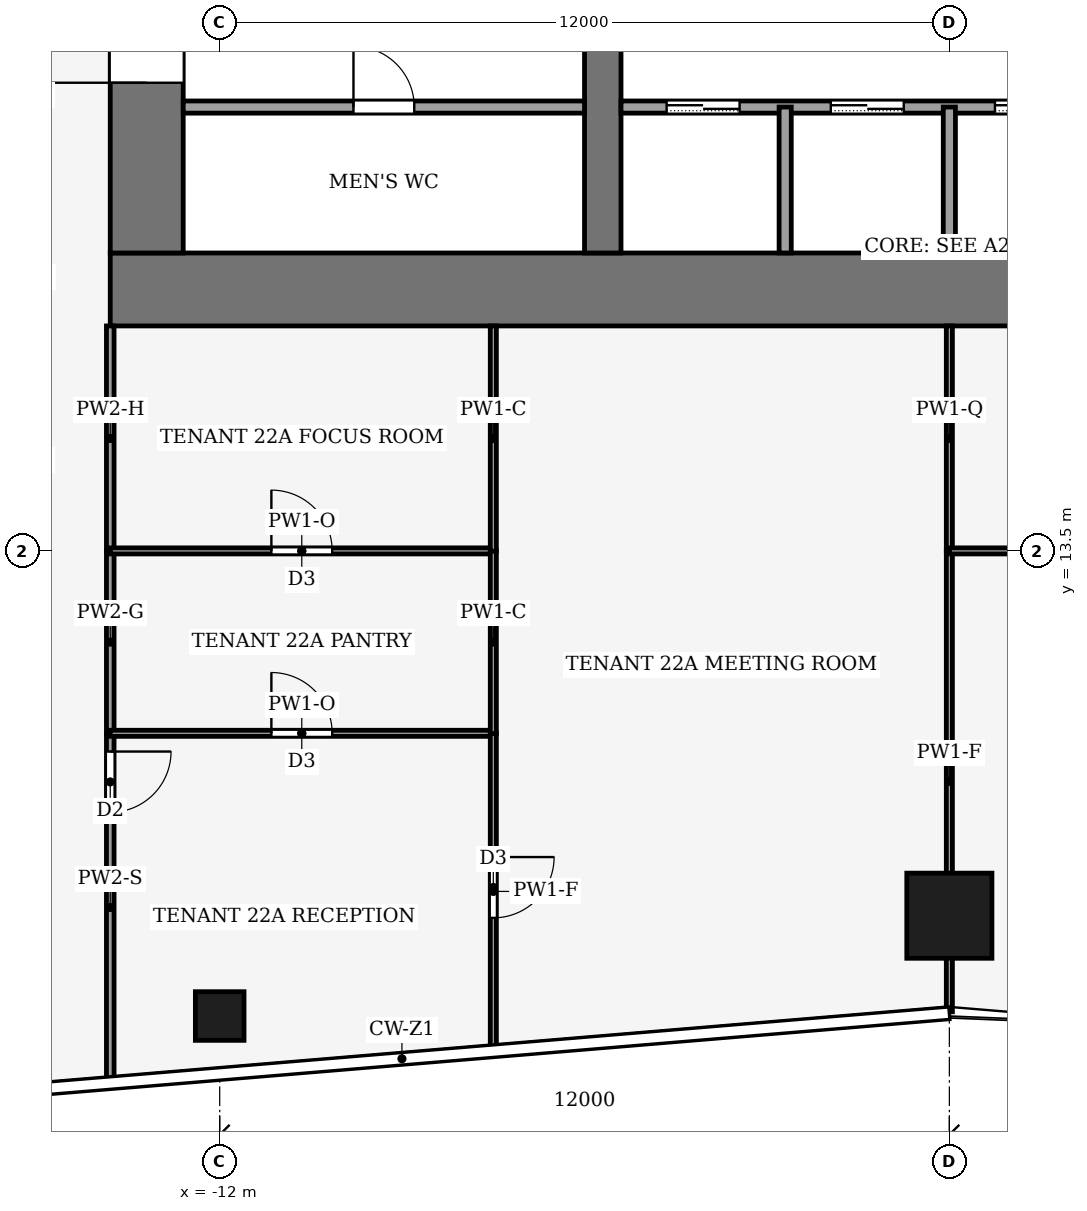
"""IFC4 building model, lengths in metres.
Left out: names, types, materials, properties, quantities, classifications, styles, units other than length and angle.
Written with IfcOpenShell. Run it as: python <this file> out.ifc"""

import sys

from ifc_helpers import new_model, si_unit, direction, frame, frame_2d, origin, origin_2d, place, context, subcontext, project, spatial, rectangle, hollow_rectangle, extrude, element, fill, save


model = new_model("IFC4")
c1 = context("Model", 3, precision=1e-05, world=origin(), true_north=direction((0.0, 1.0)))
c2 = subcontext(c1, "Body", "Model", "MODEL_VIEW")
j1 = project(units=[si_unit("LENGTHUNIT", "METRE"), si_unit("PLANEANGLEUNIT", "RADIAN")], contexts=[c1])
p1 = place(None, origin())
s1 = spatial("IfcSite", under=j1, at=p1, CompositionType="ELEMENT")
p2 = place(p1, origin())
s2 = spatial("IfcBuilding", under=s1, at=p2, CompositionType="ELEMENT")
p3 = place(p2, frame((0.0, 0.0, 98.0)))
s3 = spatial("IfcBuildingStorey", under=s2, at=p3, CompositionType="ELEMENT", Elevation=98.0)
p4 = place(p3, frame((-13.8, 17.8, -0.13), z_axis=(0.0, 0.0, 1.0), x_axis=(1.0, 0.0, 0.0)))
e1 = element("IfcWall", 1, at=p4, inside=s3, PredefinedType="SHEAR", context=c2, shape_type="SweptSolid", body=[
    extrude(rectangle(XDim=27.6, YDim=1.2, at=frame_2d((13.8, 0.0))), origin(), (0.0, 0.0, 1.0), 4.0),
])
p5 = place(p3, frame((-13.2, 18.4, -0.13), z_axis=(0.0, 0.0, 1.0), x_axis=(0.0, 1.0, 0.0)))
e2 = element("IfcWall", 2, at=p5, inside=s3, PredefinedType="SHEAR", context=c2, shape_type="SweptSolid", body=[
    extrude(rectangle(XDim=19.2, YDim=1.2, at=frame_2d((9.6, 0.0))), origin(), (0.0, 0.0, 1.0), 4.0),
])
p6 = place(p5, frame((2.8, 0.0, 0.13)))
e3 = element("IfcOpeningElement", 3, at=p6, cuts=e2, PredefinedType="OPENING", context=c2, shape_type="SweptSolid", body=[
    extrude(rectangle(XDim=2.4, YDim=2.4, at=frame_2d((1.2, 1.2))), frame((0.0, 0.61, 0.0), z_axis=(0.0, -1.0, 0.0), x_axis=(1.0, 0.0, 0.0)), (0.0, 0.0, 1.0), 1.22),
])
p7 = place(p5, frame((13.4, 0.0, 0.13)))
e4 = element("IfcOpeningElement", 4, at=p7, cuts=e2, PredefinedType="OPENING", context=c2, shape_type="SweptSolid", body=[
    extrude(rectangle(XDim=1.4, YDim=2.2, at=frame_2d((0.7, 1.1))), frame((0.0, 0.61, 0.0), z_axis=(0.0, -1.0, 0.0), x_axis=(1.0, 0.0, 0.0)), (0.0, 0.0, 1.0), 1.22),
])
p8 = place(p3, frame((-5.7, 18.4, -0.13), z_axis=(0.0, 0.0, 1.0), x_axis=(0.0, 1.0, 0.0)))
e5 = element("IfcWall", 5, at=p8, inside=s3, PredefinedType="SHEAR", context=c2, shape_type="SweptSolid", body=[
    extrude(rectangle(XDim=19.2, YDim=0.6, at=frame_2d((9.6, 0.0))), origin(), (0.0, 0.0, 1.0), 4.0),
])
p9 = place(p8, frame((8.35, 0.0, 0.13)))
e6 = element("IfcOpeningElement", 6, at=p9, cuts=e5, PredefinedType="OPENING", context=c2, shape_type="SweptSolid", body=[
    extrude(rectangle(XDim=0.9, YDim=2.1, at=frame_2d((0.45, 1.05))), frame((0.0, 0.31, 0.0), z_axis=(0.0, -1.0, 0.0), x_axis=(1.0, 0.0, 0.0)), (0.0, 0.0, 1.0), 0.62),
])
p10 = place(p3, frame((0.0, 7.5, 0.0), z_axis=(0.0, 0.0, 1.0), x_axis=(1.0, 0.0, 0.0)))
e7 = element("IfcColumn", 7, at=p10, inside=s3, PredefinedType="COLUMN", context=c2, shape_type="SweptSolid", body=[
    extrude(hollow_rectangle(XDim=1.4, YDim=1.4, WallThickness=0.08, at=origin_2d()), origin(), (0.0, 0.0, 1.0), 4.0),
])
p11 = place(p3, frame((-12.0, 5.85, 0.0), z_axis=(0.0, 0.0, 1.0), x_axis=(1.0, 0.0, 0.0)))
e8 = element("IfcColumn", 8, at=p11, inside=s3, PredefinedType="COLUMN", context=c2, shape_type="SweptSolid", body=[
    extrude(hollow_rectangle(XDim=0.8, YDim=0.8, WallThickness=0.04, at=origin_2d()), origin(), (0.0, 0.0, 1.0), 4.0),
])
p12 = place(p3, frame((-12.6, 20.8, 0.0), z_axis=(0.0, 0.0, 1.0), x_axis=(1.0, 0.0, 0.0)))
e9 = element("IfcWall", 9, at=p12, inside=s3, PredefinedType="PARTITIONING", context=c2, shape_type="SweptSolid", body=[
    extrude(rectangle(XDim=6.6, YDim=0.2, at=frame_2d((3.3, 0.0))), origin(), (0.0, 0.0, 1.0), 3.87),
])
p13 = place(p12, frame((2.8, 0.0, 0.0)))
e10 = element("IfcOpeningElement", 10, at=p13, cuts=e9, PredefinedType="OPENING", context=c2, shape_type="SweptSolid", body=[
    extrude(rectangle(XDim=1.0, YDim=2.1, at=frame_2d((0.5, 1.05))), frame((0.0, 0.11, 0.0), z_axis=(0.0, -1.0, 0.0), x_axis=(1.0, 0.0, 0.0)), (0.0, 0.0, 1.0), 0.22),
])
p14 = place(p3, frame((-5.4, 20.8, 0.0), z_axis=(0.0, 0.0, 1.0), x_axis=(1.0, 0.0, 0.0)))
e11 = element("IfcWall", 11, at=p14, inside=s3, PredefinedType="PARTITIONING", context=c2, shape_type="SweptSolid", body=[
    extrude(rectangle(XDim=10.8, YDim=0.2, at=frame_2d((5.4, 0.0))), origin(), (0.0, 0.0, 1.0), 3.87),
])
p15 = place(p14, frame((0.75, 0.0, 0.0)))
e12 = element("IfcOpeningElement", 12, at=p15, cuts=e11, PredefinedType="OPENING", context=c2, shape_type="SweptSolid", body=[
    extrude(rectangle(XDim=1.2, YDim=2.2, at=frame_2d((0.6, 1.1))), frame((0.0, 0.11, 0.0), z_axis=(0.0, -1.0, 0.0), x_axis=(1.0, 0.0, 0.0)), (0.0, 0.0, 1.0), 0.22),
])
p16 = place(p14, frame((3.45, 0.0, 0.0)))
e13 = element("IfcOpeningElement", 13, at=p16, cuts=e11, PredefinedType="OPENING", context=c2, shape_type="SweptSolid", body=[
    extrude(rectangle(XDim=1.2, YDim=2.2, at=frame_2d((0.6, 1.1))), frame((0.0, 0.11, 0.0), z_axis=(0.0, -1.0, 0.0), x_axis=(1.0, 0.0, 0.0)), (0.0, 0.0, 1.0), 0.22),
])
p17 = place(p14, frame((6.15, 0.0, 0.0)))
e14 = element("IfcOpeningElement", 14, at=p17, cuts=e11, PredefinedType="OPENING", context=c2, shape_type="SweptSolid", body=[
    extrude(rectangle(XDim=1.2, YDim=2.2, at=frame_2d((0.6, 1.1))), frame((0.0, 0.11, 0.0), z_axis=(0.0, -1.0, 0.0), x_axis=(1.0, 0.0, 0.0)), (0.0, 0.0, 1.0), 0.22),
])
p18 = place(p14, frame((8.85, 0.0, 0.0)))
e15 = element("IfcOpeningElement", 15, at=p18, cuts=e11, PredefinedType="OPENING", context=c2, shape_type="SweptSolid", body=[
    extrude(rectangle(XDim=1.2, YDim=2.2, at=frame_2d((0.6, 1.1))), frame((0.0, 0.11, 0.0), z_axis=(0.0, -1.0, 0.0), x_axis=(1.0, 0.0, 0.0)), (0.0, 0.0, 1.0), 0.22),
])
for number, where, z_axis, x_axis in (
    (16, (-2.7, 18.4, 0.0), (0.0, 0.0, 1.0), (0.0, 1.0, 0.0)),
    (17, (0.0, 18.4, 0.0), (0.0, 0.0, 1.0), (0.0, 1.0, 0.0)),
):
    element("IfcWall", number, at=place(p3, frame(where, z_axis=z_axis, x_axis=x_axis)), inside=s3, PredefinedType="PARTITIONING", context=c2, shape_type="SweptSolid", body=[
        extrude(rectangle(XDim=2.4, YDim=0.2, at=frame_2d((1.2, 0.0))), origin(), (0.0, 0.0, 1.0), 3.87),
    ])
p19 = place(p3, frame((-13.8, 10.5, 0.0), z_axis=(0.0, 0.0, 1.0), x_axis=(0.0, -1.0, 0.0)))
e18 = element("IfcWall", 18, at=p19, inside=s3, PredefinedType="PARTITIONING", context=c2, shape_type="SweptSolid", body=[
    extrude(rectangle(XDim=5.73, YDim=0.125, at=frame_2d((2.865, 0.0))), origin(), (0.0, 0.0, 1.0), 3.04),
])
p20 = place(p19, frame((0.3, 0.0, 0.0)))
e19 = element("IfcOpeningElement", 19, at=p20, cuts=e18, PredefinedType="OPENING", context=c2, shape_type="SweptSolid", body=[
    extrude(rectangle(XDim=1.0, YDim=2.1, at=frame_2d((0.5, 1.05))), frame((0.0, 0.073, 0.0), z_axis=(0.0, -1.0, 0.0), x_axis=(1.0, 0.0, 0.0)), (0.0, 0.0, 1.0), 0.145),
])
p21 = place(p3, frame((-13.8, 10.5, 0.0), z_axis=(0.0, 0.0, 1.0), x_axis=(0.0, 1.0, 0.0)))
e20 = element("IfcWall", 20, at=p21, inside=s3, PredefinedType="PARTITIONING", context=c2, shape_type="SweptSolid", body=[
    extrude(rectangle(XDim=3.0, YDim=0.125, at=frame_2d((1.5, 0.0))), origin(), (0.0, 0.0, 1.0), 3.87),
])
p22 = place(p3, frame((-13.8, 13.5, 0.0), z_axis=(0.0, 0.0, 1.0), x_axis=(0.0, 1.0, 0.0)))
e21 = element("IfcWall", 21, at=p22, inside=s3, PredefinedType="PARTITIONING", context=c2, shape_type="SweptSolid", body=[
    extrude(rectangle(XDim=3.7, YDim=0.125, at=frame_2d((1.85, 0.0))), origin(), (0.0, 0.0, 1.0), 3.14),
])
p23 = place(p3, frame((-13.8, 10.5, 0.0), z_axis=(0.0, 0.0, 1.0), x_axis=(1.0, 0.0, 0.0)))
e22 = element("IfcWall", 22, at=p23, inside=s3, PredefinedType="PARTITIONING", context=c2, shape_type="SweptSolid", body=[
    extrude(rectangle(XDim=6.3, YDim=0.1, at=frame_2d((3.15, 0.0))), origin(), (0.0, 0.0, 1.0), 3.39),
])
p24 = place(p23, frame((2.65, 0.0, 0.0)))
e23 = element("IfcOpeningElement", 23, at=p24, cuts=e22, PredefinedType="OPENING", context=c2, shape_type="SweptSolid", body=[
    extrude(rectangle(XDim=1.0, YDim=2.1, at=frame_2d((0.5, 1.05))), frame((0.0, 0.06, 0.0), z_axis=(0.0, -1.0, 0.0), x_axis=(1.0, 0.0, 0.0)), (0.0, 0.0, 1.0), 0.12),
])
p25 = place(p3, frame((-7.5, 10.504, 0.0), z_axis=(0.0, 0.0, 1.0), x_axis=(0.0, -1.0, 0.0)))
e24 = element("IfcWall", 24, at=p25, inside=s3, PredefinedType="PARTITIONING", context=c2, shape_type="SweptSolid", body=[
    extrude(rectangle(XDim=5.209, YDim=0.1, at=frame_2d((2.604, 0.0))), origin(), (0.0, 0.0, 1.0), 3.04),
])
p26 = place(p25, frame((2.039, 0.0, 0.0)))
e25 = element("IfcOpeningElement", 25, at=p26, cuts=e24, PredefinedType="OPENING", context=c2, shape_type="SweptSolid", body=[
    extrude(rectangle(XDim=1.0, YDim=2.1, at=frame_2d((0.5, 1.05))), frame((0.0, 0.06, 0.0), z_axis=(0.0, -1.0, 0.0), x_axis=(1.0, 0.0, 0.0)), (0.0, 0.0, 1.0), 0.12),
])
p27 = place(p3, frame((-13.8, 13.5, 0.0), z_axis=(0.0, 0.0, 1.0), x_axis=(1.0, 0.0, 0.0)))
e26 = element("IfcWall", 26, at=p27, inside=s3, PredefinedType="PARTITIONING", context=c2, shape_type="SweptSolid", body=[
    extrude(rectangle(XDim=6.3, YDim=0.1, at=frame_2d((3.15, 0.0))), origin(), (0.0, 0.0, 1.0), 3.39),
])
p28 = place(p27, frame((2.65, 0.0, 0.0)))
e27 = element("IfcOpeningElement", 27, at=p28, cuts=e26, PredefinedType="OPENING", context=c2, shape_type="SweptSolid", body=[
    extrude(rectangle(XDim=1.0, YDim=2.1, at=frame_2d((0.5, 1.05))), frame((0.0, 0.06, 0.0), z_axis=(0.0, -1.0, 0.0), x_axis=(1.0, 0.0, 0.0)), (0.0, 0.0, 1.0), 0.12),
])
p29 = place(p3, frame((-7.5, 10.496, 0.0), z_axis=(0.0, 0.0, 1.0), x_axis=(0.0, 1.0, 0.0)))
e28 = element("IfcWall", 28, at=p29, inside=s3, PredefinedType="PARTITIONING", context=c2, shape_type="SweptSolid", body=[
    extrude(rectangle(XDim=3.008, YDim=0.1, at=frame_2d((1.504, 0.0))), origin(), (0.0, 0.0, 1.0), 3.87),
])
p30 = place(p3, frame((-7.5, 13.496, 0.0), z_axis=(0.0, 0.0, 1.0), x_axis=(0.0, 1.0, 0.0)))
e29 = element("IfcWall", 29, at=p30, inside=s3, PredefinedType="PARTITIONING", context=c2, shape_type="SweptSolid", body=[
    extrude(rectangle(XDim=3.704, YDim=0.1, at=frame_2d((1.852, 0.0))), origin(), (0.0, 0.0, 1.0), 3.87),
])
p31 = place(p3, frame((0.0, 5.92, 0.0), z_axis=(0.0, 0.0, 1.0), x_axis=(0.0, 1.0, 0.0)))
e30 = element("IfcWall", 30, at=p31, inside=s3, PredefinedType="PARTITIONING", context=c2, shape_type="SweptSolid", body=[
    extrude(rectangle(XDim=7.58, YDim=0.1, at=frame_2d((3.79, 0.0))), origin(), (0.0, 0.0, 1.0), 3.04),
])
p32 = place(p3, frame((0.0, 13.5, 0.0), z_axis=(0.0, 0.0, 1.0), x_axis=(0.0, 1.0, 0.0)))
e31 = element("IfcWall", 31, at=p32, inside=s3, PredefinedType="PARTITIONING", context=c2, shape_type="SweptSolid", body=[
    extrude(rectangle(XDim=3.7, YDim=0.1, at=frame_2d((1.85, 0.0))), origin(), (0.0, 0.0, 1.0), 3.48),
])
p33 = place(p3, frame((0.0, 13.5, 0.0), z_axis=(0.0, 0.0, 1.0), x_axis=(1.0, 0.0, 0.0)))
e32 = element("IfcWall", 32, at=p33, inside=s3, PredefinedType="PARTITIONING", context=c2, shape_type="SweptSolid", body=[
    extrude(rectangle(XDim=7.5, YDim=0.1, at=frame_2d((3.75, 0.0))), origin(), (0.0, 0.0, 1.0), 3.44),
])
p34 = place(p33, frame((3.25, 0.0, 0.0)))
e33 = element("IfcOpeningElement", 33, at=p34, cuts=e32, PredefinedType="OPENING", context=c2, shape_type="SweptSolid", body=[
    extrude(rectangle(XDim=1.0, YDim=2.1, at=frame_2d((0.5, 1.05))), frame((0.0, 0.06, 0.0), z_axis=(0.0, -1.0, 0.0), x_axis=(1.0, 0.0, 0.0)), (0.0, 0.0, 1.0), 0.12),
])
p35 = place(p15, origin())
e34 = element("IfcDoor", 34, at=p35, inside=s3, OperationType="SLIDING_TO_LEFT", PredefinedType="DOOR", context=c2, shape_type="SweptSolid", body=[
    extrude(rectangle(XDim=1.2, YDim=2.2, at=frame_2d((0.6, 1.1))), frame((0.0, 0.025, 0.0), z_axis=(0.0, -1.0, 0.0), x_axis=(1.0, 0.0, 0.0)), (0.0, 0.0, 1.0), 0.05),
])
fill(e12, e34)
p36 = place(p16, origin())
e35 = element("IfcDoor", 35, at=p36, inside=s3, OperationType="SLIDING_TO_LEFT", PredefinedType="DOOR", context=c2, shape_type="SweptSolid", body=[
    extrude(rectangle(XDim=1.2, YDim=2.2, at=frame_2d((0.6, 1.1))), frame((0.0, 0.025, 0.0), z_axis=(0.0, -1.0, 0.0), x_axis=(1.0, 0.0, 0.0)), (0.0, 0.0, 1.0), 0.05),
])
fill(e13, e35)
p37 = place(p17, origin())
e36 = element("IfcDoor", 36, at=p37, inside=s3, OperationType="SLIDING_TO_LEFT", PredefinedType="DOOR", context=c2, shape_type="SweptSolid", body=[
    extrude(rectangle(XDim=1.2, YDim=2.2, at=frame_2d((0.6, 1.1))), frame((0.0, 0.025, 0.0), z_axis=(0.0, -1.0, 0.0), x_axis=(1.0, 0.0, 0.0)), (0.0, 0.0, 1.0), 0.05),
])
fill(e14, e36)
p38 = place(p13, origin())
e37 = element("IfcDoor", 37, at=p38, inside=s3, OperationType="SINGLE_SWING_LEFT", PredefinedType="DOOR", context=c2, shape_type="SweptSolid", body=[
    extrude(rectangle(XDim=1.0, YDim=2.1, at=frame_2d((0.5, 1.05))), frame((0.0, 0.025, 0.0), z_axis=(0.0, -1.0, 0.0), x_axis=(1.0, 0.0, 0.0)), (0.0, 0.0, 1.0), 0.05),
])
fill(e10, e37)
p39 = place(p6, origin())
e38 = element("IfcDoor", 38, at=p39, inside=s3, OperationType="DOUBLE_DOOR_SINGLE_SWING", PredefinedType="DOOR", context=c2, shape_type="SweptSolid", body=[
    extrude(rectangle(XDim=2.4, YDim=2.4, at=frame_2d((1.2, 1.2))), frame((0.0, 0.025, 0.0), z_axis=(0.0, -1.0, 0.0), x_axis=(1.0, 0.0, 0.0)), (0.0, 0.0, 1.0), 0.05),
])
fill(e3, e38)
p40 = place(p20, origin())
e39 = element("IfcDoor", 39, at=p40, inside=s3, OperationType="SINGLE_SWING_LEFT", PredefinedType="DOOR", context=c2, shape_type="SweptSolid", body=[
    extrude(rectangle(XDim=1.0, YDim=2.1, at=frame_2d((0.5, 1.05))), frame((0.0, 0.025, 0.0), z_axis=(0.0, -1.0, 0.0), x_axis=(1.0, 0.0, 0.0)), (0.0, 0.0, 1.0), 0.05),
])
fill(e19, e39)
p41 = place(p24, origin())
e40 = element("IfcDoor", 40, at=p41, inside=s3, OperationType="SINGLE_SWING_LEFT", PredefinedType="DOOR", context=c2, shape_type="SweptSolid", body=[
    extrude(rectangle(XDim=1.0, YDim=2.1, at=frame_2d((0.5, 1.05))), frame((0.0, 0.025, 0.0), z_axis=(0.0, -1.0, 0.0), x_axis=(1.0, 0.0, 0.0)), (0.0, 0.0, 1.0), 0.05),
])
fill(e23, e40)
p42 = place(p26, origin())
e41 = element("IfcDoor", 41, at=p42, inside=s3, OperationType="SINGLE_SWING_LEFT", PredefinedType="DOOR", context=c2, shape_type="SweptSolid", body=[
    extrude(rectangle(XDim=1.0, YDim=2.1, at=frame_2d((0.5, 1.05))), frame((0.0, 0.025, 0.0), z_axis=(0.0, -1.0, 0.0), x_axis=(1.0, 0.0, 0.0)), (0.0, 0.0, 1.0), 0.05),
])
fill(e25, e41)
p43 = place(p28, origin())
e42 = element("IfcDoor", 42, at=p43, inside=s3, OperationType="SINGLE_SWING_LEFT", PredefinedType="DOOR", context=c2, shape_type="SweptSolid", body=[
    extrude(rectangle(XDim=1.0, YDim=2.1, at=frame_2d((0.5, 1.05))), frame((0.0, 0.025, 0.0), z_axis=(0.0, -1.0, 0.0), x_axis=(1.0, 0.0, 0.0)), (0.0, 0.0, 1.0), 0.05),
])
fill(e27, e42)
save(model, sys.argv[1])
